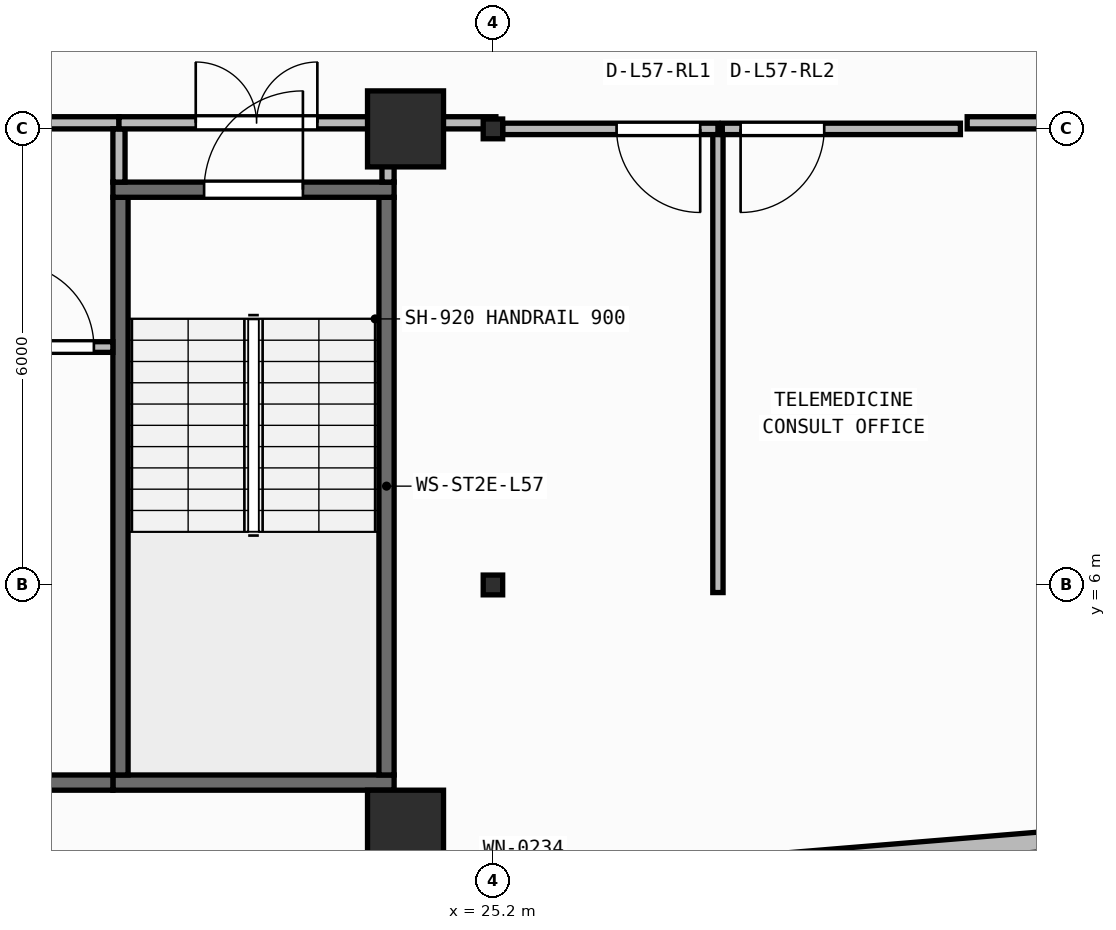
"""IFC4 building model, lengths in metres.
Left out: names, types, materials, properties, quantities, classifications, styles, units other than length and angle.
Written with IfcOpenShell. Run it as: python <this file> out.ifc"""

import sys

from ifc_helpers import new_model, si_unit, direction, frame, frame_2d, origin, origin_2d, place, context, subcontext, project, spatial, rectangle, i_section, extrude, element, fill, save


model = new_model("IFC4")
c1 = context("Model", 3, precision=1e-05, world=origin(), true_north=direction((0.0, 1.0)))
c2 = subcontext(c1, "Body", "Model", "MODEL_VIEW")
j1 = project(units=[si_unit("LENGTHUNIT", "METRE"), si_unit("PLANEANGLEUNIT", "RADIAN")], contexts=[c1])
p1 = place(None, origin())
s1 = spatial("IfcSite", under=j1, at=p1, CompositionType="ELEMENT")
p2 = place(p1, origin())
s2 = spatial("IfcBuilding", under=s1, at=p2, CompositionType="ELEMENT")
p3 = place(p2, frame((0.0, 0.0, 231.6)))
s3 = spatial("IfcBuildingStorey", under=s2, at=p3, CompositionType="ELEMENT", Elevation=231.6)
p4 = place(p3, frame((24.05, 2.8, 0.0), z_axis=(0.0, 0.0, 1.0), x_axis=(1.0, 0.0, 0.0)))
e1 = element("IfcColumn", 1, at=p4, inside=s3, PredefinedType="COLUMN", context=c2, shape_type="SweptSolid", body=[
    extrude(rectangle(XDim=1.0, YDim=1.0, at=origin_2d()), origin(), (0.0, 0.0, 1.0), 3.95),
])
p5 = place(p3, frame((25.2, 6.0, 0.0), z_axis=(0.0, 0.0, 1.0), x_axis=(1.0, 0.0, 0.0)))
e2 = element("IfcColumn", 2, at=p5, inside=s3, PredefinedType="COLUMN", context=c2, shape_type="SweptSolid", body=[
    extrude(i_section(OverallWidth=0.256, OverallDepth=0.26, WebThickness=0.01, FlangeThickness=0.017, FilletRadius=0.013, at=origin_2d()), origin(), (0.0, 0.0, 1.0), 3.95),
])
p6 = place(p3, frame((24.05, 12.0, 0.0), z_axis=(0.0, 0.0, 1.0), x_axis=(1.0, 0.0, 0.0)))
e3 = element("IfcColumn", 3, at=p6, inside=s3, PredefinedType="COLUMN", context=c2, shape_type="SweptSolid", body=[
    extrude(rectangle(XDim=1.0, YDim=1.0, at=origin_2d()), origin(), (0.0, 0.0, 1.0), 3.95),
])
p7 = place(p3, frame((25.2, 12.0, 0.0), z_axis=(0.0, 0.0, 1.0), x_axis=(1.0, 0.0, 0.0)))
e4 = element("IfcColumn", 4, at=p7, inside=s3, PredefinedType="COLUMN", context=c2, shape_type="SweptSolid", body=[
    extrude(i_section(OverallWidth=0.256, OverallDepth=0.26, WebThickness=0.01, FlangeThickness=0.017, FilletRadius=0.013, at=origin_2d()), origin(), (0.0, 0.0, 1.0), 3.95),
])
p8 = place(p3, frame((2.66, 0.174, 0.0), z_axis=(0.0, 0.0, 1.0), x_axis=(0.996634028439, 0.081979347142, 0.0)))
e5 = element("IfcWall", 5, at=p8, inside=s3, PredefinedType="STANDARD", context=c2, shape_type="SweptSolid", body=[
    extrude(rectangle(XDim=46.035, YDim=0.26, at=frame_2d((23.018, 0.0))), origin(), (0.0, 0.0, 1.0), 3.67),
])
p9 = place(p8, frame((21.817, 0.0, 0.9)))
e6 = element("IfcOpeningElement", 6, at=p9, cuts=e5, PredefinedType="OPENING", context=c2, shape_type="SweptSolid", body=[
    extrude(rectangle(XDim=2.4, YDim=1.65, at=frame_2d((1.2, 0.825))), frame((0.0, 0.14, 0.0), z_axis=(0.0, -1.0, 0.0), x_axis=(1.0, 0.0, 0.0)), (0.0, 0.0, 1.0), 0.28),
])
p10 = place(p3, frame((20.2, 3.4, 0.0), z_axis=(0.0, 0.0, 1.0), x_axis=(1.0, 0.0, 0.0)))
e7 = element("IfcWall", 7, at=p10, inside=s3, PredefinedType="SHEAR", context=c2, shape_type="SweptSolid", body=[
    extrude(rectangle(XDim=3.7, YDim=0.2, at=frame_2d((1.85, 0.0))), origin(), (0.0, 0.0, 1.0), 3.67),
])
for number, where, z_axis, x_axis in (
    (8, (20.3, 3.5, 0.0), (0.0, 0.0, 1.0), (0.0, 1.0, 0.0)),
    (9, (23.8, 3.5, 0.0), (0.0, 0.0, 1.0), (0.0, 1.0, 0.0)),
):
    element("IfcWall", number, at=place(p3, frame(where, z_axis=z_axis, x_axis=x_axis)), inside=s3, PredefinedType="SHEAR", context=c2, shape_type="SweptSolid", body=[
        extrude(rectangle(XDim=7.6, YDim=0.2, at=frame_2d((3.8, 0.0))), origin(), (0.0, 0.0, 1.0), 3.67),
    ])
p11 = place(p3, frame((20.2, 11.2, 0.0), z_axis=(0.0, 0.0, 1.0), x_axis=(1.0, 0.0, 0.0)))
e10 = element("IfcWall", 10, at=p11, inside=s3, PredefinedType="SHEAR", context=c2, shape_type="SweptSolid", body=[
    extrude(rectangle(XDim=3.7, YDim=0.2, at=frame_2d((1.85, 0.0))), origin(), (0.0, 0.0, 1.0), 3.67),
])
p12 = place(p11, frame((1.2, 0.0, 0.0)))
e11 = element("IfcOpeningElement", 11, at=p12, cuts=e10, PredefinedType="OPENING", context=c2, shape_type="SweptSolid", body=[
    extrude(rectangle(XDim=1.3, YDim=2.15, at=frame_2d((0.65, 1.075))), frame((0.0, 0.11, 0.0), z_axis=(0.0, -1.0, 0.0), x_axis=(1.0, 0.0, 0.0)), (0.0, 0.0, 1.0), 0.22),
])
p13 = place(p3, frame((6.5, 3.4, 0.0), z_axis=(0.0, 0.0, 1.0), x_axis=(1.0, 0.0, 0.0)))
e12 = element("IfcWall", 12, at=p13, inside=s3, PredefinedType="SHEAR", context=c2, shape_type="SweptSolid", body=[
    extrude(rectangle(XDim=13.7, YDim=0.2, at=frame_2d((6.85, 0.0))), origin(), (0.0, 0.0, 1.0), 3.67),
])
p14 = place(p3, frame((18.61, 9.13, 0.0), z_axis=(0.0, 0.0, 1.0), x_axis=(1.0, 0.0, 0.0)))
e13 = element("IfcWall", 13, at=p14, inside=s3, PredefinedType="PARTITIONING", context=c2, shape_type="SweptSolid", body=[
    extrude(rectangle(XDim=1.59, YDim=0.14, at=frame_2d((0.795, 0.0))), origin(), (0.0, 0.0, 1.0), 3.67),
])
p15 = place(p14, frame((0.24, 0.0, 0.0)))
e14 = element("IfcOpeningElement", 14, at=p15, cuts=e13, PredefinedType="OPENING", context=c2, shape_type="SweptSolid", body=[
    extrude(rectangle(XDim=1.1, YDim=2.1, at=frame_2d((0.55, 1.05))), frame((0.0, 0.08, 0.0), z_axis=(0.0, -1.0, 0.0), x_axis=(1.0, 0.0, 0.0)), (0.0, 0.0, 1.0), 0.16),
])
p16 = place(p3, frame((12.58, 12.08, 0.0), z_axis=(0.0, 0.0, 1.0), x_axis=(1.0, 0.0, 0.0)))
e15 = element("IfcWall", 15, at=p16, inside=s3, PredefinedType="PARTITIONING", context=c2, shape_type="SweptSolid", body=[
    extrude(rectangle(XDim=7.7, YDim=0.16, at=frame_2d((3.85, 0.0))), origin(), (0.0, 0.0, 1.0), 3.112),
])
p17 = place(p16, frame((3.05, 0.0, 0.0)))
e16 = element("IfcOpeningElement", 16, at=p17, cuts=e15, PredefinedType="OPENING", context=c2, shape_type="SweptSolid", body=[
    extrude(rectangle(XDim=1.6, YDim=2.05, at=frame_2d((0.8, 1.025))), frame((0.0, 0.09, 0.0), z_axis=(0.0, -1.0, 0.0), x_axis=(1.0, 0.0, 0.0)), (0.0, 0.0, 1.0), 0.18),
])
p18 = place(p3, frame((20.28, 11.3, 0.0), z_axis=(0.0, 0.0, 1.0), x_axis=(0.0, 1.0, 0.0)))
e17 = element("IfcWall", 17, at=p18, inside=s3, PredefinedType="PARTITIONING", context=c2, shape_type="SweptSolid", body=[
    extrude(rectangle(XDim=0.7, YDim=0.16, at=frame_2d((0.35, 0.0))), origin(), (0.0, 0.0, 1.0), 3.67),
])
p19 = place(p3, frame((20.28, 12.08, 0.0), z_axis=(0.0, 0.0, 1.0), x_axis=(1.0, 0.0, 0.0)))
e18 = element("IfcWall", 18, at=p19, inside=s3, PredefinedType="PARTITIONING", context=c2, shape_type="SweptSolid", body=[
    extrude(rectangle(XDim=3.62, YDim=0.16, at=frame_2d((1.81, 0.0))), origin(), (0.0, 0.0, 1.0), 3.112),
])
p20 = place(p19, frame((1.01, 0.0, 0.0)))
e19 = element("IfcOpeningElement", 19, at=p20, cuts=e18, PredefinedType="OPENING", context=c2, shape_type="SweptSolid", body=[
    extrude(rectangle(XDim=1.6, YDim=2.05, at=frame_2d((0.8, 1.025))), frame((0.0, 0.09, 0.0), z_axis=(0.0, -1.0, 0.0), x_axis=(1.0, 0.0, 0.0)), (0.0, 0.0, 1.0), 0.18),
])
p21 = place(p3, frame((23.82, 11.3, 0.0), z_axis=(0.0, 0.0, 1.0), x_axis=(0.0, 1.0, 0.0)))
e20 = element("IfcWall", 20, at=p21, inside=s3, PredefinedType="PARTITIONING", context=c2, shape_type="SweptSolid", body=[
    extrude(rectangle(XDim=0.7, YDim=0.16, at=frame_2d((0.35, 0.0))), origin(), (0.0, 0.0, 1.0), 3.67),
])
p22 = place(p3, frame((28.16, 5.9, 0.0), z_axis=(0.0, 0.0, 1.0), x_axis=(0.0, 1.0, 0.0)))
e21 = element("IfcWall", 21, at=p22, inside=s3, PredefinedType="PARTITIONING", context=c2, shape_type="SweptSolid", body=[
    extrude(rectangle(XDim=6.1, YDim=0.135, at=frame_2d((3.05, 0.0))), origin(), (0.0, 0.0, 1.0), 3.67),
])
p23 = place(p3, frame((28.16, 12.0, 0.0), z_axis=(0.0, 0.0, 1.0), x_axis=(-1.0, 0.0, 0.0)))
e22 = element("IfcWall", 22, at=p23, inside=s3, PredefinedType="PARTITIONING", context=c2, shape_type="SweptSolid", body=[
    extrude(rectangle(XDim=2.832, YDim=0.15, at=frame_2d((1.416, 0.0))), origin(), (0.0, 0.0, 1.0), 3.112),
])
p24 = place(p23, frame((0.233, 0.0, 0.0)))
e23 = element("IfcOpeningElement", 23, at=p24, cuts=e22, PredefinedType="OPENING", context=c2, shape_type="SweptSolid", body=[
    extrude(rectangle(XDim=1.1, YDim=2.1, at=frame_2d((0.55, 1.05))), frame((0.0, 0.085, 0.0), z_axis=(0.0, -1.0, 0.0), x_axis=(1.0, 0.0, 0.0)), (0.0, 0.0, 1.0), 0.17),
])
p25 = place(p3, frame((31.35, 12.0, 0.0), z_axis=(0.0, 0.0, 1.0), x_axis=(-1.0, 0.0, 0.0)))
e24 = element("IfcWall", 24, at=p25, inside=s3, PredefinedType="PARTITIONING", context=c2, shape_type="SweptSolid", body=[
    extrude(rectangle(XDim=3.133, YDim=0.15, at=frame_2d((1.566, 0.0))), origin(), (0.0, 0.0, 1.0), 3.112),
])
p26 = place(p25, frame((1.792, 0.0, 0.0)))
e25 = element("IfcOpeningElement", 25, at=p26, cuts=e24, PredefinedType="OPENING", context=c2, shape_type="SweptSolid", body=[
    extrude(rectangle(XDim=1.1, YDim=2.1, at=frame_2d((0.55, 1.05))), frame((0.0, 0.085, 0.0), z_axis=(0.0, -1.0, 0.0), x_axis=(1.0, 0.0, 0.0)), (0.0, 0.0, 1.0), 0.17),
])
p27 = place(p3, frame((24.02, 12.08, 0.0), z_axis=(0.0, 0.0, 1.0), x_axis=(1.0, 0.0, 0.0)))
e26 = element("IfcWall", 26, at=p27, inside=s3, PredefinedType="PARTITIONING", context=c2, shape_type="SweptSolid", body=[
    extrude(rectangle(XDim=1.219, YDim=0.16, at=frame_2d((0.609, 0.0))), origin(), (0.0, 0.0, 1.0), 3.112),
])
p28 = place(p3, frame((31.439, 12.08, 0.0), z_axis=(0.0, 0.0, 1.0), x_axis=(1.0, 0.0, 0.0)))
e27 = element("IfcWall", 27, at=p28, inside=s3, PredefinedType="PARTITIONING", context=c2, shape_type="SweptSolid", body=[
    extrude(rectangle(XDim=2.199, YDim=0.16, at=frame_2d((1.1, 0.0))), origin(), (0.0, 0.0, 1.0), 3.112),
])
p29 = place(p12, origin())
e28 = element("IfcDoor", 28, at=p29, inside=s3, OperationType="SINGLE_SWING_RIGHT", PredefinedType="DOOR", context=c2, shape_type="SweptSolid", body=[
    extrude(rectangle(XDim=1.3, YDim=2.15, at=frame_2d((0.65, 1.075))), frame((0.0, 0.025, 0.0), z_axis=(0.0, -1.0, 0.0), x_axis=(1.0, 0.0, 0.0)), (0.0, 0.0, 1.0), 0.05),
])
fill(e11, e28)
p30 = place(p15, origin())
e29 = element("IfcDoor", 29, at=p30, inside=s3, OperationType="SINGLE_SWING_LEFT", PredefinedType="DOOR", context=c2, shape_type="SweptSolid", body=[
    extrude(rectangle(XDim=1.1, YDim=2.1, at=frame_2d((0.55, 1.05))), frame((0.0, 0.025, 0.0), z_axis=(0.0, -1.0, 0.0), x_axis=(1.0, 0.0, 0.0)), (0.0, 0.0, 1.0), 0.05),
])
fill(e14, e29)
p31 = place(p20, origin())
e30 = element("IfcDoor", 30, at=p31, inside=s3, OperationType="DOUBLE_DOOR_SINGLE_SWING", PredefinedType="DOOR", context=c2, shape_type="SweptSolid", body=[
    extrude(rectangle(XDim=1.6, YDim=2.05, at=frame_2d((0.8, 1.025))), frame((0.0, 0.025, 0.0), z_axis=(0.0, -1.0, 0.0), x_axis=(1.0, 0.0, 0.0)), (0.0, 0.0, 1.0), 0.05),
])
fill(e19, e30)
p32 = place(p24, origin())
e31 = element("IfcDoor", 31, at=p32, inside=s3, OperationType="SINGLE_SWING_LEFT", PredefinedType="DOOR", context=c2, shape_type="SweptSolid", body=[
    extrude(rectangle(XDim=1.1, YDim=2.1, at=frame_2d((0.55, 1.05))), frame((0.0, 0.025, 0.0), z_axis=(0.0, -1.0, 0.0), x_axis=(1.0, 0.0, 0.0)), (0.0, 0.0, 1.0), 0.05),
])
fill(e23, e31)
p33 = place(p26, origin())
e32 = element("IfcDoor", 32, at=p33, inside=s3, OperationType="SINGLE_SWING_RIGHT", PredefinedType="DOOR", context=c2, shape_type="SweptSolid", body=[
    extrude(rectangle(XDim=1.1, YDim=2.1, at=frame_2d((0.55, 1.05))), frame((0.0, 0.025, 0.0), z_axis=(0.0, -1.0, 0.0), x_axis=(1.0, 0.0, 0.0)), (0.0, 0.0, 1.0), 0.05),
])
fill(e25, e32)
save(model, sys.argv[1])
